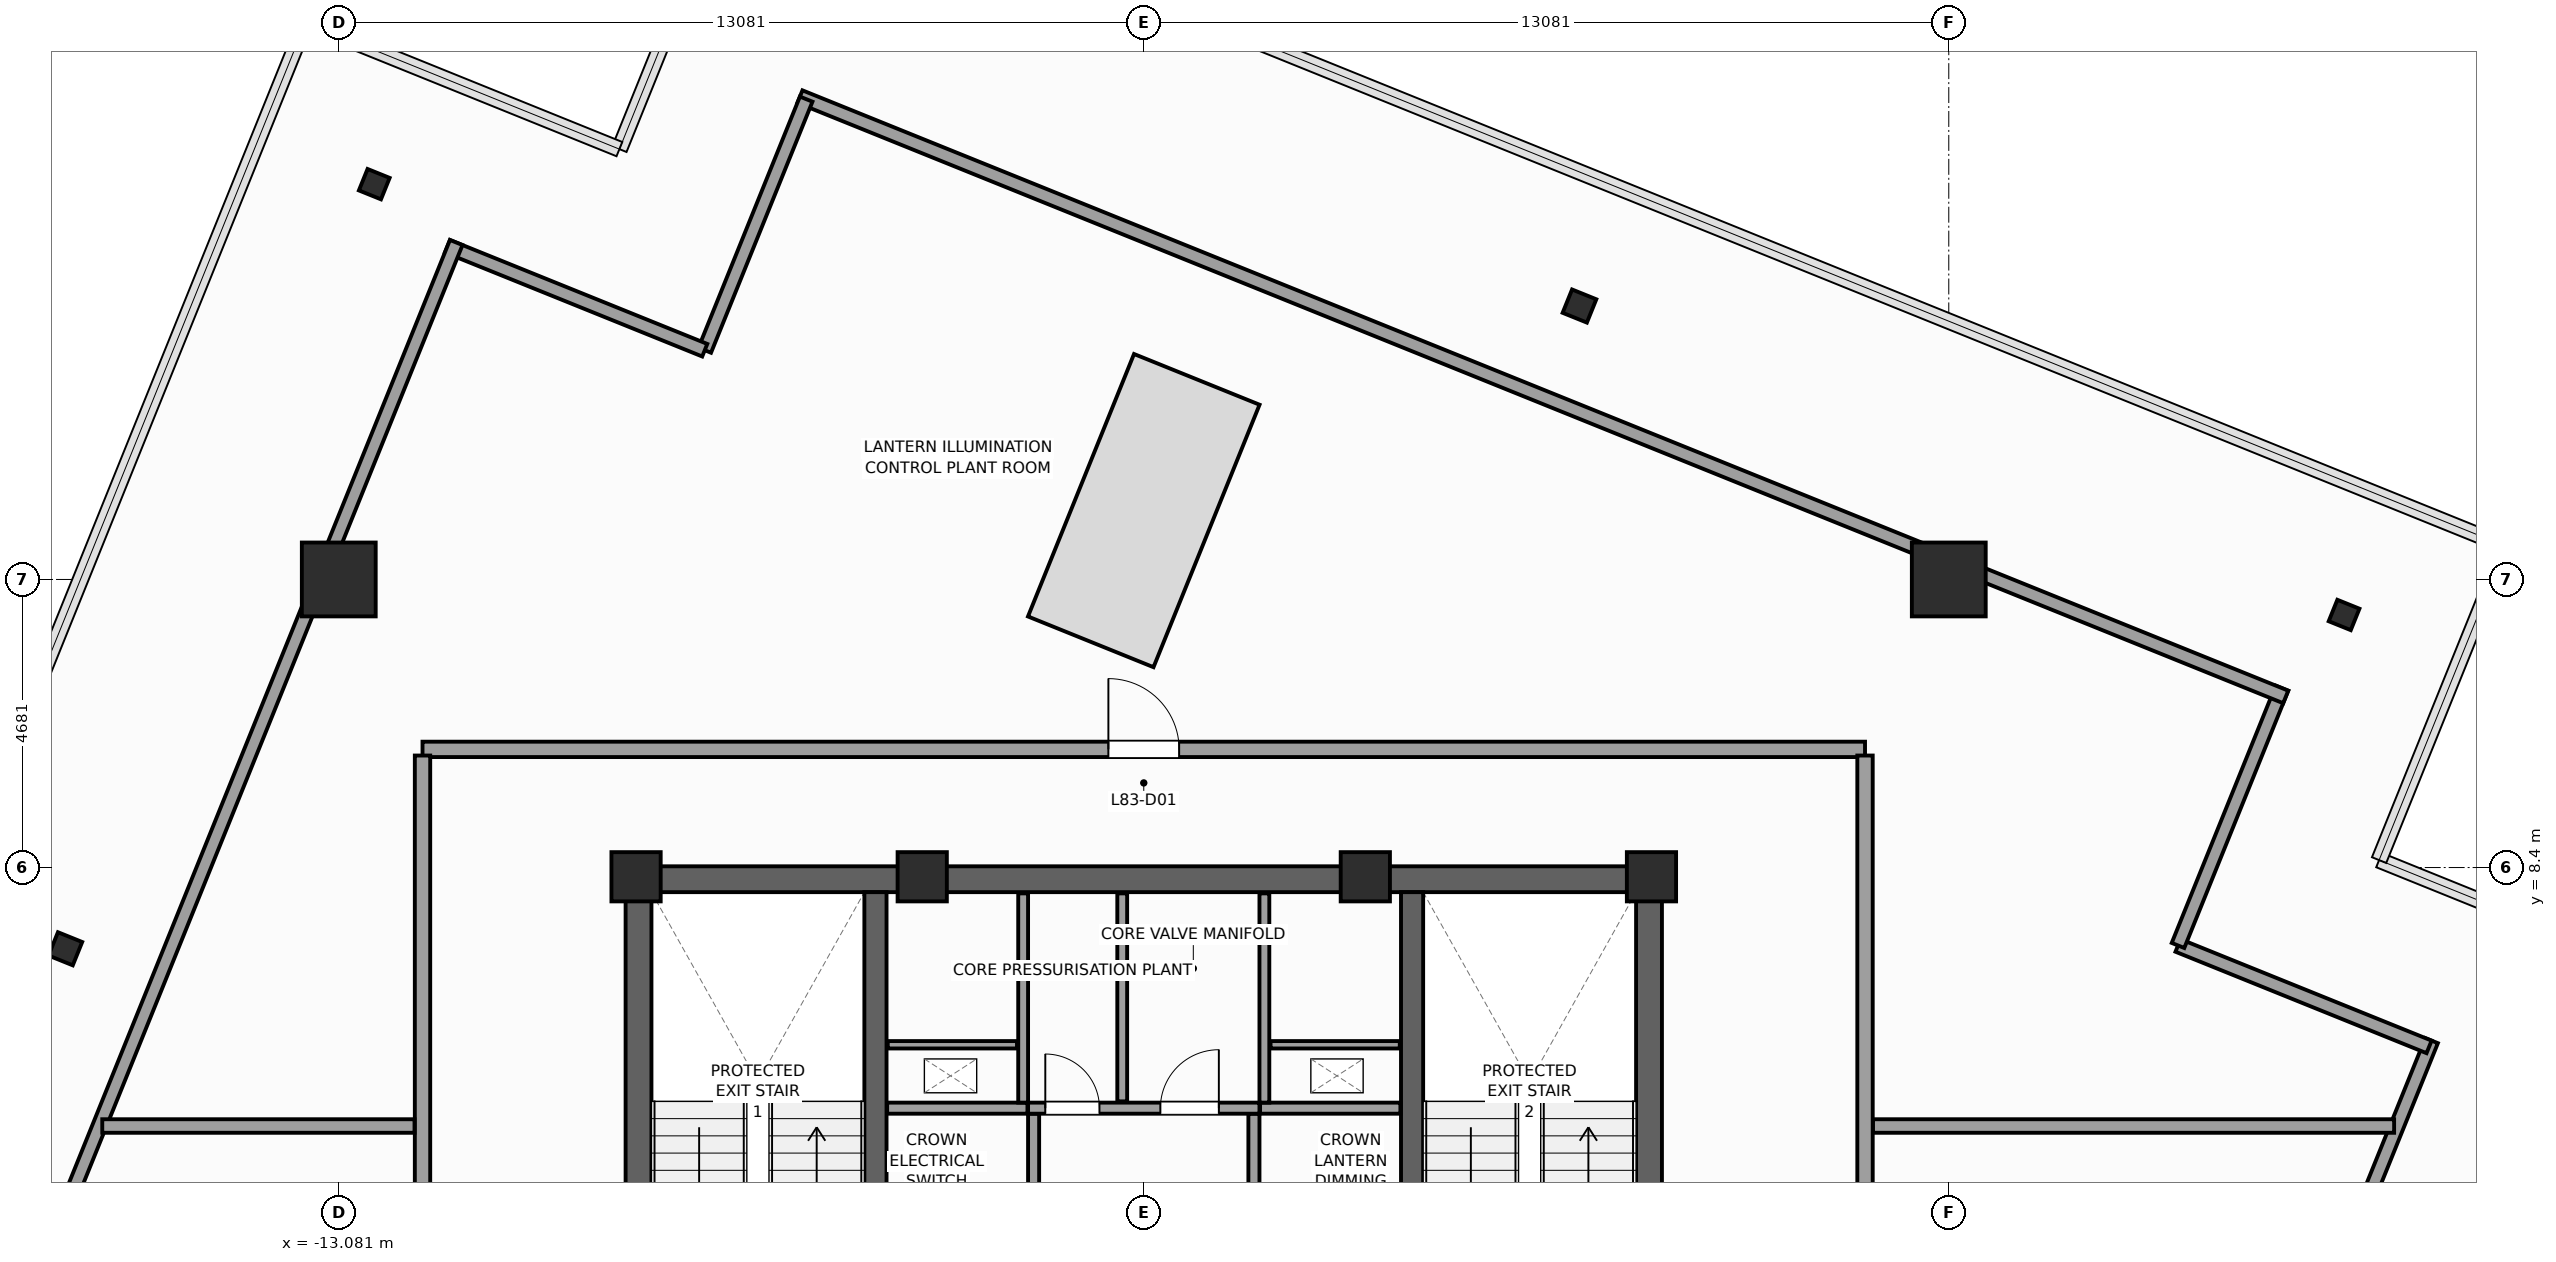
"""IFC4 building model, lengths in metres.
Left out: names, types, materials, properties, quantities, classifications, styles, units other than length and angle.
Written with IfcOpenShell. Run it as: python <this file> out.ifc"""

import sys

from ifc_helpers import new_model, si_unit, direction, frame, frame_2d, origin, origin_2d, place, context, subcontext, project, spatial, rectangle, i_section, extrude, source, transform, mapped, element, fill, save


model = new_model("IFC4")
c1 = context("Model", 3, precision=1e-05, world=origin(), true_north=direction((0.0, 1.0)))
c2 = subcontext(c1, "Body", "Model", "MODEL_VIEW")
j1 = project(units=[si_unit("LENGTHUNIT", "METRE"), si_unit("PLANEANGLEUNIT", "RADIAN")], contexts=[c1])
p1 = place(None, origin())
s1 = spatial("IfcSite", under=j1, at=p1, CompositionType="ELEMENT")
p2 = place(p1, origin())
s2 = spatial("IfcBuilding", under=s1, at=p2, CompositionType="ELEMENT")
p3 = place(p2, frame((0.0, 0.0, 337.6)))
s3 = spatial("IfcBuildingStorey", under=s2, at=p3, CompositionType="ELEMENT", Elevation=337.6)
p4 = place(p3, frame((-8.42, 8.21, 0.0), z_axis=(0.0, 0.0, 1.0), x_axis=(1.0, 0.0, 0.0)))
e1 = element("IfcWall", 1, at=p4, inside=s3, PredefinedType="SHEAR", context=c2, shape_type="SweptSolid", body=[
    extrude(rectangle(XDim=16.84, YDim=0.42, at=frame_2d((8.42, 0.0))), origin(), (0.0, 0.0, 1.0), 4.0),
])
p5 = place(p3, frame((-8.21, -8.0, 0.0), z_axis=(0.0, 0.0, 1.0), x_axis=(0.0, 1.0, 0.0)))
e2 = element("IfcWall", 2, at=p5, inside=s3, PredefinedType="SHEAR", context=c2, shape_type="SweptSolid", body=[
    extrude(rectangle(XDim=16.0, YDim=0.42, at=frame_2d((8.0, 0.0))), origin(), (0.0, 0.0, 1.0), 4.0),
])
p6 = place(p5, frame((4.69, 0.0, 0.0)))
e3 = element("IfcOpeningElement", 3, at=p6, cuts=e2, PredefinedType="OPENING", context=c2, shape_type="SweptSolid", body=[
    extrude(rectangle(XDim=1.3, YDim=2.2, at=frame_2d((0.65, 1.1))), frame((0.0, 0.22, 0.0), z_axis=(0.0, -1.0, 0.0), x_axis=(1.0, 0.0, 0.0)), (0.0, 0.0, 1.0), 0.44),
])
p7 = place(p3, frame((8.21, -8.0, 0.0), z_axis=(0.0, 0.0, 1.0), x_axis=(0.0, 1.0, 0.0)))
e4 = element("IfcWall", 4, at=p7, inside=s3, PredefinedType="SHEAR", context=c2, shape_type="SweptSolid", body=[
    extrude(rectangle(XDim=16.0, YDim=0.42, at=frame_2d((8.0, 0.0))), origin(), (0.0, 0.0, 1.0), 4.0),
])
p8 = place(p7, frame((4.69, 0.0, 0.0)))
e5 = element("IfcOpeningElement", 5, at=p8, cuts=e4, PredefinedType="OPENING", context=c2, shape_type="SweptSolid", body=[
    extrude(rectangle(XDim=1.3, YDim=2.2, at=frame_2d((0.65, 1.1))), frame((0.0, 0.22, 0.0), z_axis=(0.0, -1.0, 0.0), x_axis=(1.0, 0.0, 0.0)), (0.0, 0.0, 1.0), 0.44),
])
for number, where, z_axis, x_axis in (
    (6, (-4.36, -8.0, 0.0), (0.0, 0.0, 1.0), (0.0, 1.0, 0.0)),
    (7, (4.36, -8.0, 0.0), (0.0, 0.0, 1.0), (0.0, 1.0, 0.0)),
):
    element("IfcWall", number, at=place(p3, frame(where, z_axis=z_axis, x_axis=x_axis)), inside=s3, PredefinedType="SHEAR", context=c2, shape_type="SweptSolid", body=[
        extrude(rectangle(XDim=16.0, YDim=0.36, at=frame_2d((8.0, 0.0))), origin(), (0.0, 0.0, 1.0), 4.0),
    ])
m1 = source(origin(), c2, "Body", "SweptSolid", [
    extrude(rectangle(XDim=0.8, YDim=0.8, at=origin_2d()), origin(), (0.0, 0.0, 1.0), 4.0),
])
for number, where, z_axis, x_axis in (
    (8, (8.25, 8.25, 0.0), (0.0, 0.0, 1.0), (1.0, 0.0, 0.0)),
    (9, (-8.25, 8.25, 0.0), (0.0, 0.0, 1.0), (1.0, 0.0, 0.0)),
    (10, (-3.6, 8.25, 0.0), (0.0, 0.0, 1.0), (1.0, 0.0, 0.0)),
    (11, (3.6, 8.25, 0.0), (0.0, 0.0, 1.0), (1.0, 0.0, 0.0)),
):
    element("IfcColumn", number, at=place(p3, frame(where, z_axis=z_axis, x_axis=x_axis)), inside=s3, PredefinedType="PILASTER", context=c2, shape_type="MappedRepresentation", body=[
        mapped(m1, transform((0.0, 0.0, 0.0), scale=1.0)),
    ])
m2 = source(origin(), c2, "Body", "SweptSolid", [
    extrude(rectangle(XDim=1.2, YDim=1.2, at=origin_2d()), origin(), (0.0, 0.0, 1.0), 4.0),
])
for number, where, z_axis, x_axis in (
    (12, (13.081, 13.081, 0.0), (0.0, 0.0, 1.0), (1.0, 0.0, 0.0)),
    (13, (-13.081, 13.081, 0.0), (0.0, 0.0, 1.0), (1.0, 0.0, 0.0)),
):
    element("IfcColumn", number, at=place(p3, frame(where, z_axis=z_axis, x_axis=x_axis)), inside=s3, PredefinedType="COLUMN", context=c2, shape_type="MappedRepresentation", body=[
        mapped(m2, transform((0.0, 0.0, 0.0), scale=1.0)),
    ])
m3 = source(origin(), c2, "Body", "SweptSolid", [
    extrude(i_section(OverallWidth=0.376, OverallDepth=0.387, WebThickness=0.02, FlangeThickness=0.032, FilletRadius=0.015, at=origin_2d()), origin(), (0.0, 0.0, 1.0), 4.0),
])
p9 = place(p3, frame((19.504, 12.504, 0.0), z_axis=(0.0, 0.0, 1.0), x_axis=(0.374606593416, 0.927183854567, 0.0)))
e14 = element("IfcColumn", 14, at=p9, inside=s3, PredefinedType="COLUMN", context=c2, shape_type="MappedRepresentation", body=[
    mapped(m3, transform((0.0, 0.0, 0.0), scale=1.0)),
])
m4 = source(origin(), c2, "Body", "SweptSolid", [
    extrude(i_section(OverallWidth=0.409, OverallDepth=0.425, WebThickness=0.024, FlangeThickness=0.039, FilletRadius=0.015, at=origin_2d()), origin(), (0.0, 0.0, 1.0), 4.0),
])
p10 = place(p3, frame((7.08, 17.524, 0.0), z_axis=(0.0, 0.0, 1.0), x_axis=(0.374606593416, 0.927183854567, 0.0)))
e15 = element("IfcColumn", 15, at=p10, inside=s3, PredefinedType="COLUMN", context=c2, shape_type="MappedRepresentation", body=[
    mapped(m4, transform((0.0, 0.0, 0.0), scale=1.0)),
])
p11 = place(p3, frame((-12.504, 19.504, 0.0), z_axis=(0.0, 0.0, 1.0), x_axis=(0.374606593416, 0.927183854567, 0.0)))
e16 = element("IfcColumn", 16, at=p11, inside=s3, PredefinedType="COLUMN", context=c2, shape_type="MappedRepresentation", body=[
    mapped(m3, transform((0.0, 0.0, 0.0), scale=1.0)),
])
p12 = place(p3, frame((-17.524, 7.08, 0.0), z_axis=(0.0, 0.0, 1.0), x_axis=(0.374606593416, 0.927183854567, 0.0)))
e17 = element("IfcColumn", 17, at=p12, inside=s3, PredefinedType="COLUMN", context=c2, shape_type="MappedRepresentation", body=[
    mapped(m4, transform((0.0, 0.0, 0.0), scale=1.0)),
])
p13 = place(p3, frame((-1.79, -7.98, 0.0), z_axis=(0.0, 0.0, 1.0), x_axis=(0.0, 1.0, 0.0)))
e18 = element("IfcWall", 18, at=p13, inside=s3, PredefinedType="PARTITIONING", context=c2, shape_type="SweptSolid", body=[
    extrude(rectangle(XDim=12.38, YDim=0.18, at=frame_2d((6.19, 0.0))), origin(), (0.0, 0.0, 1.0), 3.7),
])
p14 = place(p13, frame((1.4, 0.0, 0.0)))
e19 = element("IfcOpeningElement", 19, at=p14, cuts=e18, PredefinedType="OPENING", context=c2, shape_type="SweptSolid", body=[
    extrude(rectangle(XDim=1.15, YDim=2.25, at=frame_2d((0.575, 1.125))), frame((0.0, 0.1, 0.0), z_axis=(0.0, -1.0, 0.0), x_axis=(1.0, 0.0, 0.0)), (0.0, 0.0, 1.0), 0.2),
])
p15 = place(p13, frame((5.6, 0.0, 0.0)))
e20 = element("IfcOpeningElement", 20, at=p15, cuts=e18, PredefinedType="OPENING", context=c2, shape_type="SweptSolid", body=[
    extrude(rectangle(XDim=1.15, YDim=2.25, at=frame_2d((0.575, 1.125))), frame((0.0, 0.1, 0.0), z_axis=(0.0, -1.0, 0.0), x_axis=(1.0, 0.0, 0.0)), (0.0, 0.0, 1.0), 0.2),
])
p16 = place(p13, frame((9.8, 0.0, 0.0)))
e21 = element("IfcOpeningElement", 21, at=p16, cuts=e18, PredefinedType="OPENING", context=c2, shape_type="SweptSolid", body=[
    extrude(rectangle(XDim=1.15, YDim=2.25, at=frame_2d((0.575, 1.125))), frame((0.0, 0.1, 0.0), z_axis=(0.0, -1.0, 0.0), x_axis=(1.0, 0.0, 0.0)), (0.0, 0.0, 1.0), 0.2),
])
p17 = place(p3, frame((1.79, -7.98, 0.0), z_axis=(0.0, 0.0, 1.0), x_axis=(0.0, 1.0, 0.0)))
e22 = element("IfcWall", 22, at=p17, inside=s3, PredefinedType="PARTITIONING", context=c2, shape_type="SweptSolid", body=[
    extrude(rectangle(XDim=12.38, YDim=0.18, at=frame_2d((6.19, 0.0))), origin(), (0.0, 0.0, 1.0), 3.7),
])
p18 = place(p17, frame((3.5, 0.0, 0.0)))
e23 = element("IfcOpeningElement", 23, at=p18, cuts=e22, PredefinedType="OPENING", context=c2, shape_type="SweptSolid", body=[
    extrude(rectangle(XDim=1.15, YDim=2.25, at=frame_2d((0.575, 1.125))), frame((0.0, 0.1, 0.0), z_axis=(0.0, -1.0, 0.0), x_axis=(1.0, 0.0, 0.0)), (0.0, 0.0, 1.0), 0.2),
])
p19 = place(p17, frame((9.8, 0.0, 0.0)))
e24 = element("IfcOpeningElement", 24, at=p19, cuts=e22, PredefinedType="OPENING", context=c2, shape_type="SweptSolid", body=[
    extrude(rectangle(XDim=1.15, YDim=2.25, at=frame_2d((0.575, 1.125))), frame((0.0, 0.1, 0.0), z_axis=(0.0, -1.0, 0.0), x_axis=(1.0, 0.0, 0.0)), (0.0, 0.0, 1.0), 0.2),
])
p20 = place(p3, frame((-1.88, 4.49, 0.0), z_axis=(0.0, 0.0, 1.0), x_axis=(1.0, 0.0, 0.0)))
e25 = element("IfcWall", 25, at=p20, inside=s3, PredefinedType="PARTITIONING", context=c2, shape_type="SweptSolid", body=[
    extrude(rectangle(XDim=3.76, YDim=0.18, at=frame_2d((1.88, 0.0))), origin(), (0.0, 0.0, 1.0), 3.7),
])
p21 = place(p20, frame((0.28, 0.0, 0.0)))
e26 = element("IfcOpeningElement", 26, at=p21, cuts=e25, PredefinedType="OPENING", context=c2, shape_type="SweptSolid", body=[
    extrude(rectangle(XDim=0.88, YDim=2.1, at=frame_2d((0.44, 1.05))), frame((0.0, 0.1, 0.0), z_axis=(0.0, -1.0, 0.0), x_axis=(1.0, 0.0, 0.0)), (0.0, 0.0, 1.0), 0.2),
])
p22 = place(p20, frame((2.15, 0.0, 0.0)))
e27 = element("IfcOpeningElement", 27, at=p22, cuts=e25, PredefinedType="OPENING", context=c2, shape_type="SweptSolid", body=[
    extrude(rectangle(XDim=0.95, YDim=2.1, at=frame_2d((0.475, 1.05))), frame((0.0, 0.1, 0.0), z_axis=(0.0, -1.0, 0.0), x_axis=(1.0, 0.0, 0.0)), (0.0, 0.0, 1.0), 0.2),
])
for number, where, z_axis, x_axis in (
    (28, (-4.17, 4.49, 0.0), (0.0, 0.0, 1.0), (1.0, 0.0, 0.0)),
    (29, (1.89, 4.49, 0.0), (0.0, 0.0, 1.0), (1.0, 0.0, 0.0)),
):
    element("IfcWall", number, at=place(p3, frame(where, z_axis=z_axis, x_axis=x_axis)), inside=s3, PredefinedType="PARTITIONING", context=c2, shape_type="SweptSolid", body=[
        extrude(rectangle(XDim=2.28, YDim=0.18, at=frame_2d((1.14, 0.0))), origin(), (0.0, 0.0, 1.0), 3.7),
    ])
for number, where, z_axis, x_axis in (
    (30, (-1.96, 4.58, 0.0), (0.0, 0.0, 1.0), (0.0, 1.0, 0.0)),
    (31, (1.96, 4.58, 0.0), (0.0, 0.0, 1.0), (0.0, 1.0, 0.0)),
):
    element("IfcWall", number, at=place(p3, frame(where, z_axis=z_axis, x_axis=x_axis)), inside=s3, PredefinedType="PARTITIONING", context=c2, shape_type="SweptSolid", body=[
        extrude(rectangle(XDim=3.4, YDim=0.16, at=frame_2d((1.7, 0.0))), origin(), (0.0, 0.0, 1.0), 3.7),
    ])
for number, where, z_axis, x_axis in (
    (32, (-4.16, 5.52, 0.0), (0.0, 0.0, 1.0), (1.0, 0.0, 0.0)),
    (33, (2.06, 5.52, 0.0), (0.0, 0.0, 1.0), (1.0, 0.0, 0.0)),
):
    element("IfcWall", number, at=place(p3, frame(where, z_axis=z_axis, x_axis=x_axis)), inside=s3, PredefinedType="PARTITIONING", context=c2, shape_type="SweptSolid", body=[
        extrude(rectangle(XDim=2.1, YDim=0.12, at=frame_2d((1.05, 0.0))), origin(), (0.0, 0.0, 1.0), 3.7),
    ])
p23 = place(p3, frame((-0.35, 4.6, 0.0), z_axis=(0.0, 0.0, 1.0), x_axis=(0.0, 1.0, 0.0)))
e34 = element("IfcWall", 34, at=p23, inside=s3, PredefinedType="PARTITIONING", context=c2, shape_type="SweptSolid", body=[
    extrude(rectangle(XDim=3.38, YDim=0.16, at=frame_2d((1.69, 0.0))), origin(), (0.0, 0.0, 1.0), 3.7),
])
p24 = place(p3, frame((11.172, -18.556, 0.0), z_axis=(0.0, 0.0, 1.0), x_axis=(0.374611707018, 0.927181788521, 0.0)))
e35 = element("IfcWall", 35, at=p24, inside=s3, PredefinedType="PARTITIONING", context=c2, shape_type="SweptSolid", body=[
    extrude(rectangle(XDim=26.04, YDim=0.22, at=frame_2d((13.02, 0.0))), origin(), (0.0, 0.0, 1.0), 3.05),
])
p25 = place(p3, frame((20.886, 5.486, 0.0), z_axis=(0.0, 0.0, 1.0), x_axis=(-0.927189216671, 0.374593321469, 0.0)))
e36 = element("IfcWall", 36, at=p25, inside=s3, PredefinedType="PARTITIONING", context=c2, shape_type="SweptSolid", body=[
    extrude(rectangle(XDim=4.4, YDim=0.22, at=frame_2d((2.2, 0.0))), origin(), (0.0, 0.0, 1.0), 3.7),
])
p26 = place(p3, frame((16.806, 7.134, 0.0), z_axis=(0.0, 0.0, 1.0), x_axis=(0.374599091925, 0.927186885331, 0.0)))
e37 = element("IfcWall", 37, at=p26, inside=s3, PredefinedType="PARTITIONING", context=c2, shape_type="SweptSolid", body=[
    extrude(rectangle(XDim=4.51, YDim=0.22, at=frame_2d((2.255, 0.0))), origin(), (0.0, 0.0, 1.0), 3.7),
])
p27 = place(p3, frame((18.556, 11.172, 0.0), z_axis=(0.0, 0.0, 1.0), x_axis=(-0.927181788521, 0.374611707018, 0.0)))
e38 = element("IfcWall", 38, at=p27, inside=s3, PredefinedType="PARTITIONING", context=c2, shape_type="SweptSolid", body=[
    extrude(rectangle(XDim=26.04, YDim=0.22, at=frame_2d((13.02, 0.0))), origin(), (0.0, 0.0, 1.0), 3.05),
])
p28 = place(p3, frame((-5.486, 20.886, 0.0), z_axis=(0.0, 0.0, 1.0), x_axis=(-0.374593321469, -0.927189216671, 0.0)))
e39 = element("IfcWall", 39, at=p28, inside=s3, PredefinedType="PARTITIONING", context=c2, shape_type="SweptSolid", body=[
    extrude(rectangle(XDim=4.4, YDim=0.22, at=frame_2d((2.2, 0.0))), origin(), (0.0, 0.0, 1.0), 3.7),
])
p29 = place(p3, frame((-7.134, 16.806, 0.0), z_axis=(0.0, 0.0, 1.0), x_axis=(-0.927186885331, 0.374599091925, 0.0)))
e40 = element("IfcWall", 40, at=p29, inside=s3, PredefinedType="PARTITIONING", context=c2, shape_type="SweptSolid", body=[
    extrude(rectangle(XDim=4.51, YDim=0.22, at=frame_2d((2.255, 0.0))), origin(), (0.0, 0.0, 1.0), 3.7),
])
p30 = place(p3, frame((-11.172, 18.556, 0.0), z_axis=(0.0, 0.0, 1.0), x_axis=(-0.374611707018, -0.927181788521, 0.0)))
e41 = element("IfcWall", 41, at=p30, inside=s3, PredefinedType="PARTITIONING", context=c2, shape_type="SweptSolid", body=[
    extrude(rectangle(XDim=26.04, YDim=0.22, at=frame_2d((13.02, 0.0))), origin(), (0.0, 0.0, 1.0), 3.05),
])
p31 = place(p3, frame((-11.72, 10.32, 0.0), z_axis=(0.0, 0.0, 1.0), x_axis=(1.0, 0.0, 0.0)))
e42 = element("IfcWall", 42, at=p31, inside=s3, PredefinedType="PARTITIONING", context=c2, shape_type="SweptSolid", body=[
    extrude(rectangle(XDim=23.44, YDim=0.25, at=frame_2d((11.72, 0.0))), origin(), (0.0, 0.0, 1.0), 3.7),
])
p32 = place(p31, frame((11.145, 0.0, 0.0)))
e43 = element("IfcOpeningElement", 43, at=p32, cuts=e42, PredefinedType="OPENING", context=c2, shape_type="SweptSolid", body=[
    extrude(rectangle(XDim=1.15, YDim=2.25, at=frame_2d((0.575, 1.125))), frame((0.0, 0.135, 0.0), z_axis=(0.0, -1.0, 0.0), x_axis=(1.0, 0.0, 0.0)), (0.0, 0.0, 1.0), 0.27),
])
p33 = place(p3, frame((-11.72, -11.62, 0.0), z_axis=(0.0, 0.0, 1.0), x_axis=(0.0, 1.0, 0.0)))
e44 = element("IfcWall", 44, at=p33, inside=s3, PredefinedType="PARTITIONING", context=c2, shape_type="SweptSolid", body=[
    extrude(rectangle(XDim=21.84, YDim=0.25, at=frame_2d((10.92, 0.0))), origin(), (0.0, 0.0, 1.0), 3.7),
])
p34 = place(p33, frame((11.045, 0.0, 0.0)))
e45 = element("IfcOpeningElement", 45, at=p34, cuts=e44, PredefinedType="OPENING", context=c2, shape_type="SweptSolid", body=[
    extrude(rectangle(XDim=1.15, YDim=2.25, at=frame_2d((0.575, 1.125))), frame((0.0, 0.135, 0.0), z_axis=(0.0, -1.0, 0.0), x_axis=(1.0, 0.0, 0.0)), (0.0, 0.0, 1.0), 0.27),
])
p35 = place(p3, frame((11.72, -11.62, 0.0), z_axis=(0.0, 0.0, 1.0), x_axis=(0.0, 1.0, 0.0)))
e46 = element("IfcWall", 46, at=p35, inside=s3, PredefinedType="PARTITIONING", context=c2, shape_type="SweptSolid", body=[
    extrude(rectangle(XDim=21.84, YDim=0.25, at=frame_2d((10.92, 0.0))), origin(), (0.0, 0.0, 1.0), 3.7),
])
p36 = place(p35, frame((11.045, 0.0, 0.0)))
e47 = element("IfcOpeningElement", 47, at=p36, cuts=e46, PredefinedType="OPENING", context=c2, shape_type="SweptSolid", body=[
    extrude(rectangle(XDim=1.15, YDim=2.25, at=frame_2d((0.575, 1.125))), frame((0.0, 0.135, 0.0), z_axis=(0.0, -1.0, 0.0), x_axis=(1.0, 0.0, 0.0)), (0.0, 0.0, 1.0), 0.27),
])
p37 = place(p3, frame((11.85, 4.2, 0.0), z_axis=(0.0, 0.0, 1.0), x_axis=(1.0, 0.0, 0.0)))
e48 = element("IfcWall", 48, at=p37, inside=s3, PredefinedType="PARTITIONING", context=c2, shape_type="SweptSolid", body=[
    extrude(rectangle(XDim=8.468, YDim=0.22, at=frame_2d((4.234, 0.0))), origin(), (0.0, 0.0, 1.0), 3.7),
])
p38 = place(p3, frame((-11.85, 4.2, 0.0), z_axis=(0.0, 0.0, 1.0), x_axis=(-1.0, 0.0, 0.0)))
e49 = element("IfcWall", 49, at=p38, inside=s3, PredefinedType="PARTITIONING", context=c2, shape_type="SweptSolid", body=[
    extrude(rectangle(XDim=5.074, YDim=0.22, at=frame_2d((2.537, 0.0))), origin(), (0.0, 0.0, 1.0), 3.7),
])
m5 = source(origin(), c2, "Body", "SweptSolid", [
    extrude(rectangle(XDim=0.88, YDim=2.1, at=frame_2d((0.44, 1.05))), frame((0.0, 0.025, 0.0), z_axis=(0.0, -1.0, 0.0), x_axis=(1.0, 0.0, 0.0)), (0.0, 0.0, 1.0), 0.05),
])
p39 = place(p21, origin())
e50 = element("IfcDoor", 50, at=p39, inside=s3, OperationType="SINGLE_SWING_LEFT", PredefinedType="DOOR", context=c2, shape_type="MappedRepresentation", body=[
    mapped(m5, transform((0.0, 0.0, 0.0), scale=1.0)),
])
fill(e26, e50)
m6 = source(origin(), c2, "Body", "SweptSolid", [
    extrude(rectangle(XDim=0.95, YDim=2.1, at=frame_2d((0.475, 1.05))), frame((0.0, 0.025, 0.0), z_axis=(0.0, -1.0, 0.0), x_axis=(1.0, 0.0, 0.0)), (0.0, 0.0, 1.0), 0.05),
])
p40 = place(p22, origin())
e51 = element("IfcDoor", 51, at=p40, inside=s3, OperationType="SINGLE_SWING_RIGHT", PredefinedType="DOOR", context=c2, shape_type="MappedRepresentation", body=[
    mapped(m6, transform((0.0, 0.0, 0.0), scale=1.0)),
])
fill(e27, e51)
m7 = source(origin(), c2, "Body", "SweptSolid", [
    extrude(rectangle(XDim=1.15, YDim=2.25, at=frame_2d((0.575, 1.125))), frame((0.0, 0.025, 0.0), z_axis=(0.0, -1.0, 0.0), x_axis=(1.0, 0.0, 0.0)), (0.0, 0.0, 1.0), 0.05),
])
p41 = place(p32, origin())
e52 = element("IfcDoor", 52, at=p41, inside=s3, OperationType="SINGLE_SWING_LEFT", PredefinedType="DOOR", context=c2, shape_type="MappedRepresentation", body=[
    mapped(m7, transform((0.0, 0.0, 0.0), scale=1.0)),
])
fill(e43, e52)
save(model, sys.argv[1])
